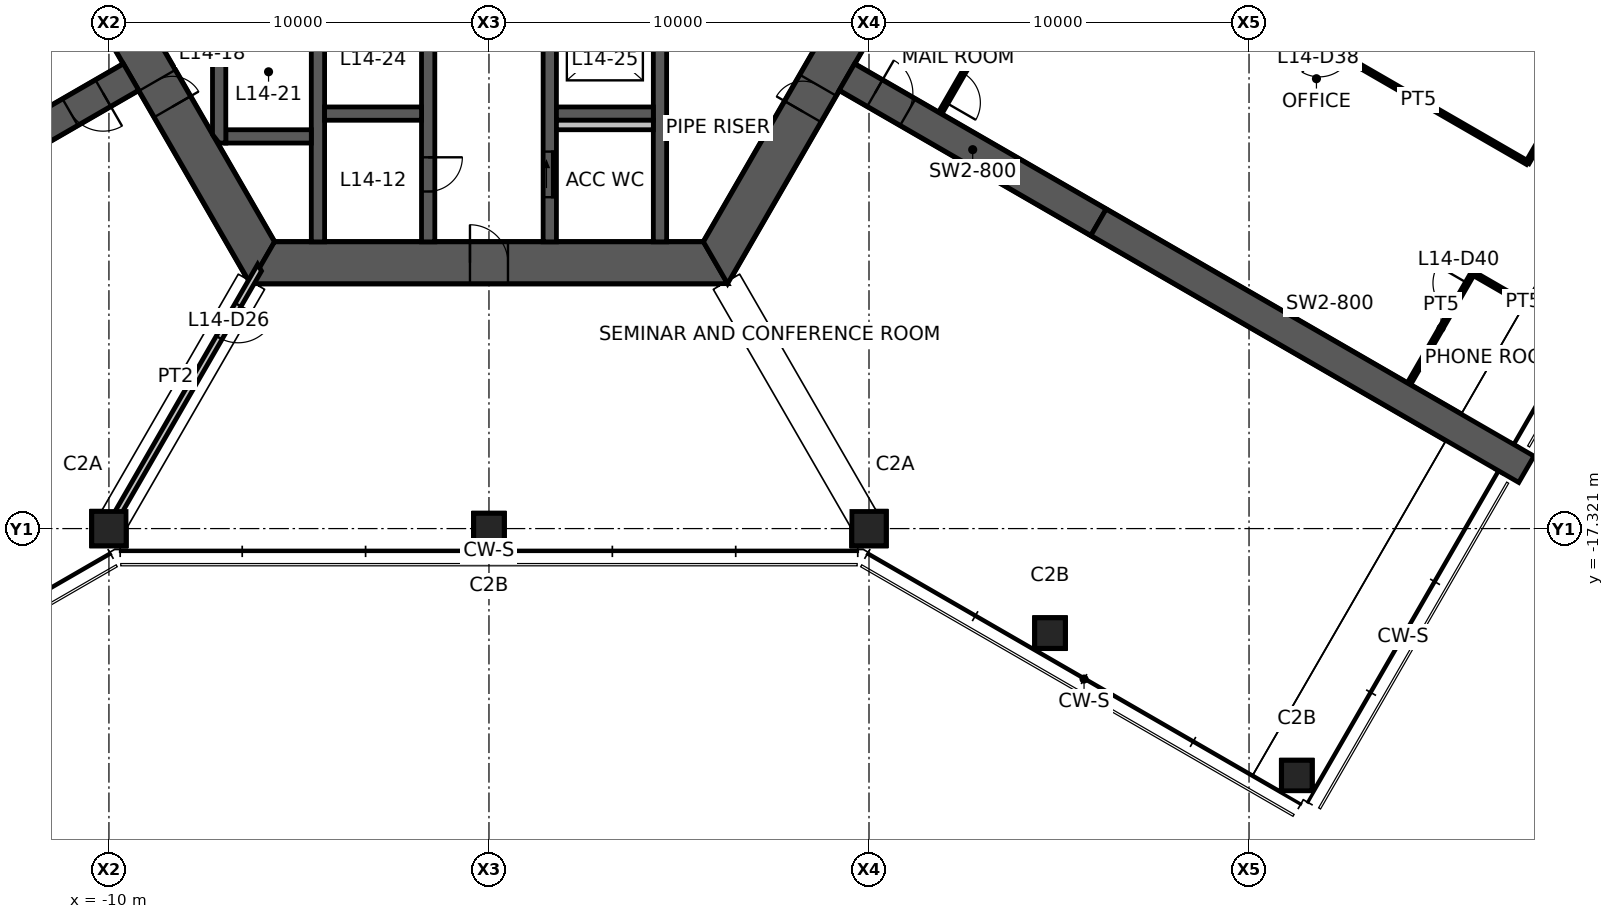
"""IFC4 building model, lengths in metres.
Left out: names, types, materials, properties, quantities, classifications, styles, units other than length and angle.
Written with IfcOpenShell. Run it as: python <this file> out.ifc"""

import sys

from ifc_helpers import new_model, si_unit, direction, frame, frame_2d, origin, origin_2d, place, context, subcontext, project, spatial, polyline, rectangle, hollow_rectangle, outline, extrude, element, fill, save


model = new_model("IFC4")
c1 = context("Model", 3, precision=1e-05, world=origin(), true_north=direction((0.0, 1.0)))
c2 = subcontext(c1, "Body", "Model", "MODEL_VIEW")
j1 = project(units=[si_unit("LENGTHUNIT", "METRE"), si_unit("PLANEANGLEUNIT", "RADIAN")], contexts=[c1])
p1 = place(None, origin())
s1 = spatial("IfcSite", under=j1, at=p1, CompositionType="ELEMENT")
p2 = place(p1, origin())
s2 = spatial("IfcBuilding", under=s1, at=p2, CompositionType="ELEMENT")
p3 = place(p2, frame((0.0, 0.0, 57.0)))
s3 = spatial("IfcBuildingStorey", under=s2, at=p3, CompositionType="ELEMENT", Elevation=57.0)
for number, where, z_axis, x_axis in (
    (1, (-10.0, -17.321, 0.0), (0.0, 0.0, 1.0), (1.0, 0.0, 0.0)),
    (2, (10.0, -17.321, 0.0), (0.0, 0.0, 1.0), (1.0, 0.0, 0.0)),
):
    element("IfcColumn", number, at=place(p3, frame(where, z_axis=z_axis, x_axis=x_axis)), inside=s3, PredefinedType="COLUMN", context=c2, shape_type="SweptSolid", body=[
        extrude(hollow_rectangle(XDim=0.9, YDim=0.9, WallThickness=0.055, at=origin_2d()), origin(), (0.0, 0.0, 1.0), 4.2),
    ])
for number, where, z_axis, x_axis in (
    (3, (0.0, -17.321, 0.0), (0.0, 0.0, 1.0), (1.0, 0.0, 0.0)),
    (4, (14.763, -20.071, 0.0), (0.0, 0.0, 1.0), (1.0, 0.0, 0.0)),
    (5, (21.258, -23.821, 0.0), (0.0, 0.0, 1.0), (1.0, 0.0, 0.0)),
):
    element("IfcColumn", number, at=place(p3, frame(where, z_axis=z_axis, x_axis=x_axis)), inside=s3, PredefinedType="COLUMN", context=c2, shape_type="SweptSolid", body=[
        extrude(hollow_rectangle(XDim=0.8, YDim=0.8, WallThickness=0.045, at=origin_2d()), origin(), (0.0, 0.0, 1.0), 4.2),
    ])
p4 = place(p3, frame((-11.922, 0.0, 0.0), z_axis=(0.0, 0.0, 1.0), x_axis=(0.500004296715, -0.866022923061, 0.0)))
e6 = element("IfcWall", 6, at=p4, inside=s3, PredefinedType="SHEAR", context=c2, shape_type="SweptSolid", body=[
    extrude(outline(polyline([(-0.318, -0.55), (6.381, -0.55), (7.181, -0.55), (12.24, -0.55), (11.605, 0.55), (7.181, 0.55), (6.381, 0.55), (0.318, 0.55), (-0.318, -0.55)])), origin(), (0.0, 0.0, 1.0), 4.2),
])
p5 = place(p4, frame((6.381, 0.0, 0.0)))
e7 = element("IfcOpeningElement", 7, at=p5, cuts=e6, PredefinedType="OPENING", context=c2, shape_type="SweptSolid", body=[
    extrude(rectangle(XDim=0.8, YDim=2.1, at=frame_2d((0.4, 1.05))), frame((0.0, 0.56, 0.0), z_axis=(0.0, -1.0, 0.0), x_axis=(1.0, 0.0, 0.0)), (0.0, 0.0, 1.0), 1.12),
])
p6 = place(p3, frame((-5.961, -10.325, 0.0), z_axis=(0.0, 0.0, 1.0), x_axis=(1.0, 0.0, 0.0)))
e8 = element("IfcWall", 8, at=p6, inside=s3, PredefinedType="SHEAR", context=c2, shape_type="SweptSolid", body=[
    extrude(outline(polyline([(-0.318, -0.55), (5.461, -0.55), (6.461, -0.55), (12.24, -0.55), (11.605, 0.55), (6.461, 0.55), (5.461, 0.55), (0.318, 0.55), (-0.318, -0.55)])), origin(), (0.0, 0.0, 1.0), 4.2),
])
p7 = place(p6, frame((5.461, 0.0, 0.0)))
e9 = element("IfcOpeningElement", 9, at=p7, cuts=e8, PredefinedType="OPENING", context=c2, shape_type="SweptSolid", body=[
    extrude(rectangle(XDim=1.0, YDim=2.1, at=frame_2d((0.5, 1.05))), frame((0.0, 0.56, 0.0), z_axis=(0.0, -1.0, 0.0), x_axis=(1.0, 0.0, 0.0)), (0.0, 0.0, 1.0), 1.12),
])
p8 = place(p3, frame((5.961, -10.325, 0.0), z_axis=(0.0, 0.0, 1.0), x_axis=(0.500004296715, 0.866022923061, 0.0)))
e10 = element("IfcWall", 10, at=p8, inside=s3, PredefinedType="SHEAR", context=c2, shape_type="SweptSolid", body=[
    extrude(outline(polyline([(-0.318, -0.55), (4.594, -0.55), (5.394, -0.55), (12.24, -0.55), (11.605, 0.55), (5.394, 0.55), (4.594, 0.55), (0.318, 0.55), (-0.318, -0.55)])), origin(), (0.0, 0.0, 1.0), 4.2),
])
p9 = place(p8, frame((4.594, 0.0, 0.0)))
e11 = element("IfcOpeningElement", 11, at=p9, cuts=e10, PredefinedType="OPENING", context=c2, shape_type="SweptSolid", body=[
    extrude(rectangle(XDim=0.8, YDim=2.1, at=frame_2d((0.4, 1.05))), frame((0.0, 0.56, 0.0), z_axis=(0.0, -1.0, 0.0), x_axis=(1.0, 0.0, 0.0)), (0.0, 0.0, 1.0), 1.12),
])
p10 = place(p3, frame((-9.418, -5.438, 0.0), z_axis=(0.0, 0.0, 1.0), x_axis=(-0.866029782078, -0.499992416496, 0.0)))
e12 = element("IfcWall", 12, at=p10, inside=s3, PredefinedType="SHEAR", context=c2, shape_type="SweptSolid", body=[
    extrude(rectangle(XDim=7.646, YDim=0.8, at=frame_2d((3.823, 0.0))), origin(), (0.0, 0.0, 1.0), 4.2),
])
p11 = place(p10, frame((0.85, 0.0, 0.0)))
e13 = element("IfcOpeningElement", 13, at=p11, cuts=e12, PredefinedType="OPENING", context=c2, shape_type="SweptSolid", body=[
    extrude(rectangle(XDim=1.0, YDim=2.1, at=frame_2d((0.5, 1.05))), frame((0.0, 0.41, 0.0), z_axis=(0.0, -1.0, 0.0), x_axis=(1.0, 0.0, 0.0)), (0.0, 0.0, 1.0), 0.82),
])
p12 = place(p3, frame((9.418, -5.438, 0.0), z_axis=(0.0, 0.0, 1.0), x_axis=(0.866029782078, -0.499992416496, 0.0)))
e14 = element("IfcWall", 14, at=p12, inside=s3, PredefinedType="SHEAR", context=c2, shape_type="SweptSolid", body=[
    extrude(rectangle(XDim=7.646, YDim=0.8, at=frame_2d((3.823, 0.0))), origin(), (0.0, 0.0, 1.0), 4.2),
])
p13 = place(p12, frame((0.85, 0.0, 0.0)))
e15 = element("IfcOpeningElement", 15, at=p13, cuts=e14, PredefinedType="OPENING", context=c2, shape_type="SweptSolid", body=[
    extrude(rectangle(XDim=1.0, YDim=2.1, at=frame_2d((0.5, 1.05))), frame((0.0, 0.41, 0.0), z_axis=(0.0, -1.0, 0.0), x_axis=(1.0, 0.0, 0.0)), (0.0, 0.0, 1.0), 0.82),
])
p14 = place(p3, frame((16.039, -9.26, 0.0), z_axis=(0.0, 0.0, 1.0), x_axis=(0.866024837091, -0.50000098154, 0.0)))
e16 = element("IfcWall", 16, at=p14, inside=s3, PredefinedType="SHEAR", context=c2, shape_type="SweptSolid", body=[
    extrude(rectangle(XDim=13.0, YDim=0.8, at=frame_2d((6.5, 0.0))), origin(), (0.0, 0.0, 1.0), 4.2),
])
p15 = place(p3, frame((-1.6, -3.775, 0.0), z_axis=(0.0, 0.0, 1.0), x_axis=(0.0, -1.0, 0.0)))
e17 = element("IfcWall", 17, at=p15, inside=s3, PredefinedType="SHEAR", context=c2, shape_type="SweptSolid", body=[
    extrude(rectangle(XDim=6.0, YDim=0.35, at=frame_2d((3.0, 0.0))), origin(), (0.0, 0.0, 1.0), 4.2),
])
p16 = place(p15, frame((3.775, 0.0, 0.0)))
e18 = element("IfcOpeningElement", 18, at=p16, cuts=e17, PredefinedType="OPENING", context=c2, shape_type="SweptSolid", body=[
    extrude(rectangle(XDim=0.9, YDim=2.1, at=frame_2d((0.45, 1.05))), frame((0.0, 0.185, 0.0), z_axis=(0.0, -1.0, 0.0), x_axis=(1.0, 0.0, 0.0)), (0.0, 0.0, 1.0), 0.37),
])
p17 = place(p3, frame((1.6, -3.775, 0.0), z_axis=(0.0, 0.0, 1.0), x_axis=(0.0, -1.0, 0.0)))
e19 = element("IfcWall", 19, at=p17, inside=s3, PredefinedType="SHEAR", context=c2, shape_type="SweptSolid", body=[
    extrude(rectangle(XDim=6.0, YDim=0.35, at=frame_2d((3.0, 0.0))), origin(), (0.0, 0.0, 1.0), 4.2),
])
p18 = place(p17, frame((3.625, 0.0, 0.0)))
e20 = element("IfcOpeningElement", 20, at=p18, cuts=e19, PredefinedType="OPENING", context=c2, shape_type="SweptSolid", body=[
    extrude(rectangle(XDim=1.2, YDim=2.1, at=frame_2d((0.6, 1.05))), frame((0.0, 0.185, 0.0), z_axis=(0.0, -1.0, 0.0), x_axis=(1.0, 0.0, 0.0)), (0.0, 0.0, 1.0), 0.37),
])
for number, where, z_axis, x_axis in (
    (21, (-4.5, -3.775, 0.0), (0.0, 0.0, 1.0), (0.0, -1.0, 0.0)),
    (22, (4.5, -3.775, 0.0), (0.0, 0.0, 1.0), (0.0, -1.0, 0.0)),
):
    element("IfcWall", number, at=place(p3, frame(where, z_axis=z_axis, x_axis=x_axis)), inside=s3, PredefinedType="SHEAR", context=c2, shape_type="SweptSolid", body=[
        extrude(rectangle(XDim=6.0, YDim=0.35, at=frame_2d((3.0, 0.0))), origin(), (0.0, 0.0, 1.0), 4.2),
    ])
for number, where, z_axis, x_axis in (
    (23, (-4.325, -6.4, 0.0), (0.0, 0.0, 1.0), (1.0, 0.0, 0.0)),
    (24, (1.775, -6.4, 0.0), (0.0, 0.0, 1.0), (1.0, 0.0, 0.0)),
):
    element("IfcWall", number, at=place(p3, frame(where, z_axis=z_axis, x_axis=x_axis)), inside=s3, PredefinedType="SHEAR", context=c2, shape_type="SweptSolid", body=[
        extrude(rectangle(XDim=2.55, YDim=0.35, at=frame_2d((1.275, 0.0))), origin(), (0.0, 0.0, 1.0), 4.2),
    ])
p19 = place(p3, frame((-6.925, -7.0, 0.0), z_axis=(0.0, 0.0, 1.0), x_axis=(1.0, 0.0, 0.0)))
e25 = element("IfcWall", 25, at=p19, inside=s3, PredefinedType="SHEAR", context=c2, shape_type="SweptSolid", body=[
    extrude(rectangle(XDim=2.25, YDim=0.35, at=frame_2d((1.125, 0.0))), origin(), (0.0, 0.0, 1.0), 4.2),
])
p20 = place(p3, frame((-7.1, -3.775, 0.0), z_axis=(0.0, 0.0, 1.0), x_axis=(0.0, -1.0, 0.0)))
e26 = element("IfcWall", 26, at=p20, inside=s3, PredefinedType="SHEAR", context=c2, shape_type="SweptSolid", body=[
    extrude(outline(polyline([(0.0, -0.175), (3.175, -0.175), (3.4, 0.0), (3.4, 0.175), (0.0, 0.175), (0.0, -0.175)])), origin(), (0.0, 0.0, 1.0), 4.2),
])
p21 = place(p3, frame((1.775, -6.7, 0.0), z_axis=(0.0, 0.0, 1.0), x_axis=(1.0, 0.0, 0.0)))
e27 = element("IfcWall", 27, at=p21, inside=s3, PredefinedType="PLUMBINGWALL", context=c2, shape_type="SweptSolid", body=[
    extrude(rectangle(XDim=2.55, YDim=0.25, at=frame_2d((1.275, 0.0))), origin(), (0.0, 0.0, 1.0), 4.2),
])
p22 = place(p3, frame((-6.036, -10.455, 0.0), z_axis=(0.0, 0.0, 1.0), x_axis=(-0.500007693191, -0.866020962073, 0.0)))
e28 = element("IfcWall", 28, at=p22, inside=s3, PredefinedType="PARTITIONING", context=c2, shape_type="SweptSolid", body=[
    extrude(outline(polyline([(-0.051, -0.087), (1.127, -0.087), (2.127, -0.087), (7.928, -0.087), (7.928, 0.087), (2.127, 0.087), (1.127, 0.087), (0.051, 0.087), (-0.051, -0.087)])), origin(), (0.0, 0.0, 1.0), 3.35),
])
p23 = place(p22, frame((1.127, 0.0, 0.0)))
e29 = element("IfcOpeningElement", 29, at=p23, cuts=e28, PredefinedType="OPENING", context=c2, shape_type="SweptSolid", body=[
    extrude(rectangle(XDim=1.0, YDim=2.1, at=frame_2d((0.5, 1.05))), frame((0.0, 0.098, 0.0), z_axis=(0.0, -1.0, 0.0), x_axis=(1.0, 0.0, 0.0)), (0.0, 0.0, 1.0), 0.195),
])
p24 = place(p3, frame((27.325, -7.693, 0.0), z_axis=(0.0, 0.0, 1.0), x_axis=(-0.866021597574, 0.500006592492, 0.0)))
e30 = element("IfcWall", 30, at=p24, inside=s3, PredefinedType="PARTITIONING", context=c2, shape_type="SweptSolid", body=[
    extrude(rectangle(XDim=6.62, YDim=0.1, at=frame_2d((3.31, 0.0))), origin(), (0.0, 0.0, 1.0), 3.25),
])
p25 = place(p24, frame((5.42, 0.0, 0.0)))
e31 = element("IfcOpeningElement", 31, at=p25, cuts=e30, PredefinedType="OPENING", context=c2, shape_type="SweptSolid", body=[
    extrude(rectangle(XDim=0.9, YDim=2.1, at=frame_2d((0.45, 1.05))), frame((0.0, 0.06, 0.0), z_axis=(0.0, -1.0, 0.0), x_axis=(1.0, 0.0, 0.0)), (0.0, 0.0, 1.0), 0.12),
])
p26 = place(p3, frame((29.06, -4.688, 0.0), z_axis=(0.0, 0.0, 1.0), x_axis=(-0.500020871164, -0.866013353477, 0.0)))
e32 = element("IfcWall", 32, at=p26, inside=s3, PredefinedType="PARTITIONING", context=c2, shape_type="SweptSolid", body=[
    extrude(rectangle(XDim=3.47, YDim=0.1, at=frame_2d((1.735, 0.0))), origin(), (0.0, 0.0, 1.0), 3.25),
])
p27 = place(p3, frame((13.97, -2.754, 0.0), z_axis=(0.0, 0.0, 1.0), x_axis=(-0.499801669165, -0.866139879869, 0.0)))
e33 = element("IfcWall", 33, at=p27, inside=s3, PredefinedType="PARTITIONING", context=c2, shape_type="SweptSolid", body=[
    extrude(rectangle(XDim=4.18, YDim=0.1, at=frame_2d((2.09, 0.0))), origin(), (0.0, 0.0, 1.0), 3.25),
])
p28 = place(p27, frame((2.98, 0.0, 0.0)))
e34 = element("IfcOpeningElement", 34, at=p28, cuts=e33, PredefinedType="OPENING", context=c2, shape_type="SweptSolid", body=[
    extrude(rectangle(XDim=0.9, YDim=2.1, at=frame_2d((0.45, 1.05))), frame((0.0, 0.06, 0.0), z_axis=(0.0, -1.0, 0.0), x_axis=(1.0, 0.0, 0.0)), (0.0, 0.0, 1.0), 0.12),
])
p29 = place(p3, frame((24.217, -13.497, 0.0), z_axis=(0.0, 0.0, 1.0), x_axis=(0.499928740635, 0.866066541489, 0.0)))
e35 = element("IfcWall", 35, at=p29, inside=s3, PredefinedType="PARTITIONING", context=c2, shape_type="SweptSolid", body=[
    extrude(rectangle(XDim=3.347, YDim=0.1, at=frame_2d((1.673, 0.0))), origin(), (0.0, 0.0, 1.0), 3.25),
])
p30 = place(p29, frame((2.147, 0.0, 0.0)))
e36 = element("IfcOpeningElement", 36, at=p30, cuts=e35, PredefinedType="OPENING", context=c2, shape_type="SweptSolid", body=[
    extrude(rectangle(XDim=0.9, YDim=2.1, at=frame_2d((0.45, 1.05))), frame((0.0, 0.06, 0.0), z_axis=(0.0, -1.0, 0.0), x_axis=(1.0, 0.0, 0.0)), (0.0, 0.0, 1.0), 0.12),
])
p31 = place(p3, frame((25.89, -10.598, 0.0), z_axis=(0.0, 0.0, 1.0), x_axis=(0.866002828817, -0.500039098953, 0.0)))
e37 = element("IfcWall", 37, at=p31, inside=s3, PredefinedType="PARTITIONING", context=c2, shape_type="SweptSolid", body=[
    extrude(rectangle(XDim=3.07, YDim=0.1, at=frame_2d((1.535, 0.0))), origin(), (0.0, 0.0, 1.0), 3.25),
])
p32 = place(p7, origin())
e38 = element("IfcDoor", 38, at=p32, inside=s3, OperationType="SINGLE_SWING_LEFT", PredefinedType="DOOR", context=c2, shape_type="SweptSolid", body=[
    extrude(rectangle(XDim=1.0, YDim=2.1, at=frame_2d((0.5, 1.05))), frame((0.0, 0.025, 0.0), z_axis=(0.0, -1.0, 0.0), x_axis=(1.0, 0.0, 0.0)), (0.0, 0.0, 1.0), 0.05),
])
fill(e9, e38)
p33 = place(p9, origin())
e39 = element("IfcDoor", 39, at=p33, inside=s3, OperationType="SINGLE_SWING_LEFT", PredefinedType="DOOR", context=c2, shape_type="SweptSolid", body=[
    extrude(rectangle(XDim=0.8, YDim=2.1, at=frame_2d((0.4, 1.05))), frame((0.0, 0.025, 0.0), z_axis=(0.0, -1.0, 0.0), x_axis=(1.0, 0.0, 0.0)), (0.0, 0.0, 1.0), 0.05),
])
fill(e11, e39)
p34 = place(p5, origin())
e40 = element("IfcDoor", 40, at=p34, inside=s3, OperationType="SINGLE_SWING_RIGHT", PredefinedType="DOOR", context=c2, shape_type="SweptSolid", body=[
    extrude(rectangle(XDim=0.8, YDim=2.1, at=frame_2d((0.4, 1.05))), frame((0.0, 0.025, 0.0), z_axis=(0.0, -1.0, 0.0), x_axis=(1.0, 0.0, 0.0)), (0.0, 0.0, 1.0), 0.05),
])
fill(e7, e40)
p35 = place(p18, origin())
e41 = element("IfcDoor", 41, at=p35, inside=s3, OperationType="SLIDING_TO_LEFT", PredefinedType="DOOR", context=c2, shape_type="SweptSolid", body=[
    extrude(rectangle(XDim=1.2, YDim=2.1, at=frame_2d((0.6, 1.05))), frame((0.0, 0.025, 0.0), z_axis=(0.0, -1.0, 0.0), x_axis=(1.0, 0.0, 0.0)), (0.0, 0.0, 1.0), 0.05),
])
fill(e20, e41)
p36 = place(p16, origin())
e42 = element("IfcDoor", 42, at=p36, inside=s3, OperationType="SINGLE_SWING_LEFT", PredefinedType="DOOR", context=c2, shape_type="SweptSolid", body=[
    extrude(rectangle(XDim=0.9, YDim=2.1, at=frame_2d((0.45, 1.05))), frame((0.0, 0.025, 0.0), z_axis=(0.0, -1.0, 0.0), x_axis=(1.0, 0.0, 0.0)), (0.0, 0.0, 1.0), 0.05),
])
fill(e18, e42)
p37 = place(p11, origin())
e43 = element("IfcDoor", 43, at=p37, inside=s3, OperationType="SINGLE_SWING_LEFT", PredefinedType="DOOR", context=c2, shape_type="SweptSolid", body=[
    extrude(rectangle(XDim=1.0, YDim=2.1, at=frame_2d((0.5, 1.05))), frame((0.0, 0.025, 0.0), z_axis=(0.0, -1.0, 0.0), x_axis=(1.0, 0.0, 0.0)), (0.0, 0.0, 1.0), 0.05),
])
fill(e13, e43)
p38 = place(p13, origin())
e44 = element("IfcDoor", 44, at=p38, inside=s3, OperationType="SINGLE_SWING_LEFT", PredefinedType="DOOR", context=c2, shape_type="SweptSolid", body=[
    extrude(rectangle(XDim=1.0, YDim=2.1, at=frame_2d((0.5, 1.05))), frame((0.0, 0.025, 0.0), z_axis=(0.0, -1.0, 0.0), x_axis=(1.0, 0.0, 0.0)), (0.0, 0.0, 1.0), 0.05),
])
fill(e15, e44)
p39 = place(p23, origin())
e45 = element("IfcDoor", 45, at=p39, inside=s3, OperationType="SINGLE_SWING_LEFT", PredefinedType="DOOR", context=c2, shape_type="SweptSolid", body=[
    extrude(rectangle(XDim=1.0, YDim=2.1, at=frame_2d((0.5, 1.05))), frame((0.0, 0.025, 0.0), z_axis=(0.0, -1.0, 0.0), x_axis=(1.0, 0.0, 0.0)), (0.0, 0.0, 1.0), 0.05),
])
fill(e29, e45)
p40 = place(p25, origin())
e46 = element("IfcDoor", 46, at=p40, inside=s3, OperationType="SINGLE_SWING_RIGHT", PredefinedType="DOOR", context=c2, shape_type="SweptSolid", body=[
    extrude(rectangle(XDim=0.9, YDim=2.1, at=frame_2d((0.45, 1.05))), frame((0.0, 0.025, 0.0), z_axis=(0.0, -1.0, 0.0), x_axis=(1.0, 0.0, 0.0)), (0.0, 0.0, 1.0), 0.05),
])
fill(e31, e46)
p41 = place(p28, origin())
e47 = element("IfcDoor", 47, at=p41, inside=s3, OperationType="SINGLE_SWING_RIGHT", PredefinedType="DOOR", context=c2, shape_type="SweptSolid", body=[
    extrude(rectangle(XDim=0.9, YDim=2.1, at=frame_2d((0.45, 1.05))), frame((0.0, 0.025, 0.0), z_axis=(0.0, -1.0, 0.0), x_axis=(1.0, 0.0, 0.0)), (0.0, 0.0, 1.0), 0.05),
])
fill(e34, e47)
p42 = place(p30, origin())
e48 = element("IfcDoor", 48, at=p42, inside=s3, OperationType="SINGLE_SWING_RIGHT", PredefinedType="DOOR", context=c2, shape_type="SweptSolid", body=[
    extrude(rectangle(XDim=0.9, YDim=2.1, at=frame_2d((0.45, 1.05))), frame((0.0, 0.025, 0.0), z_axis=(0.0, -1.0, 0.0), x_axis=(1.0, 0.0, 0.0)), (0.0, 0.0, 1.0), 0.05),
])
fill(e36, e48)
save(model, sys.argv[1])
